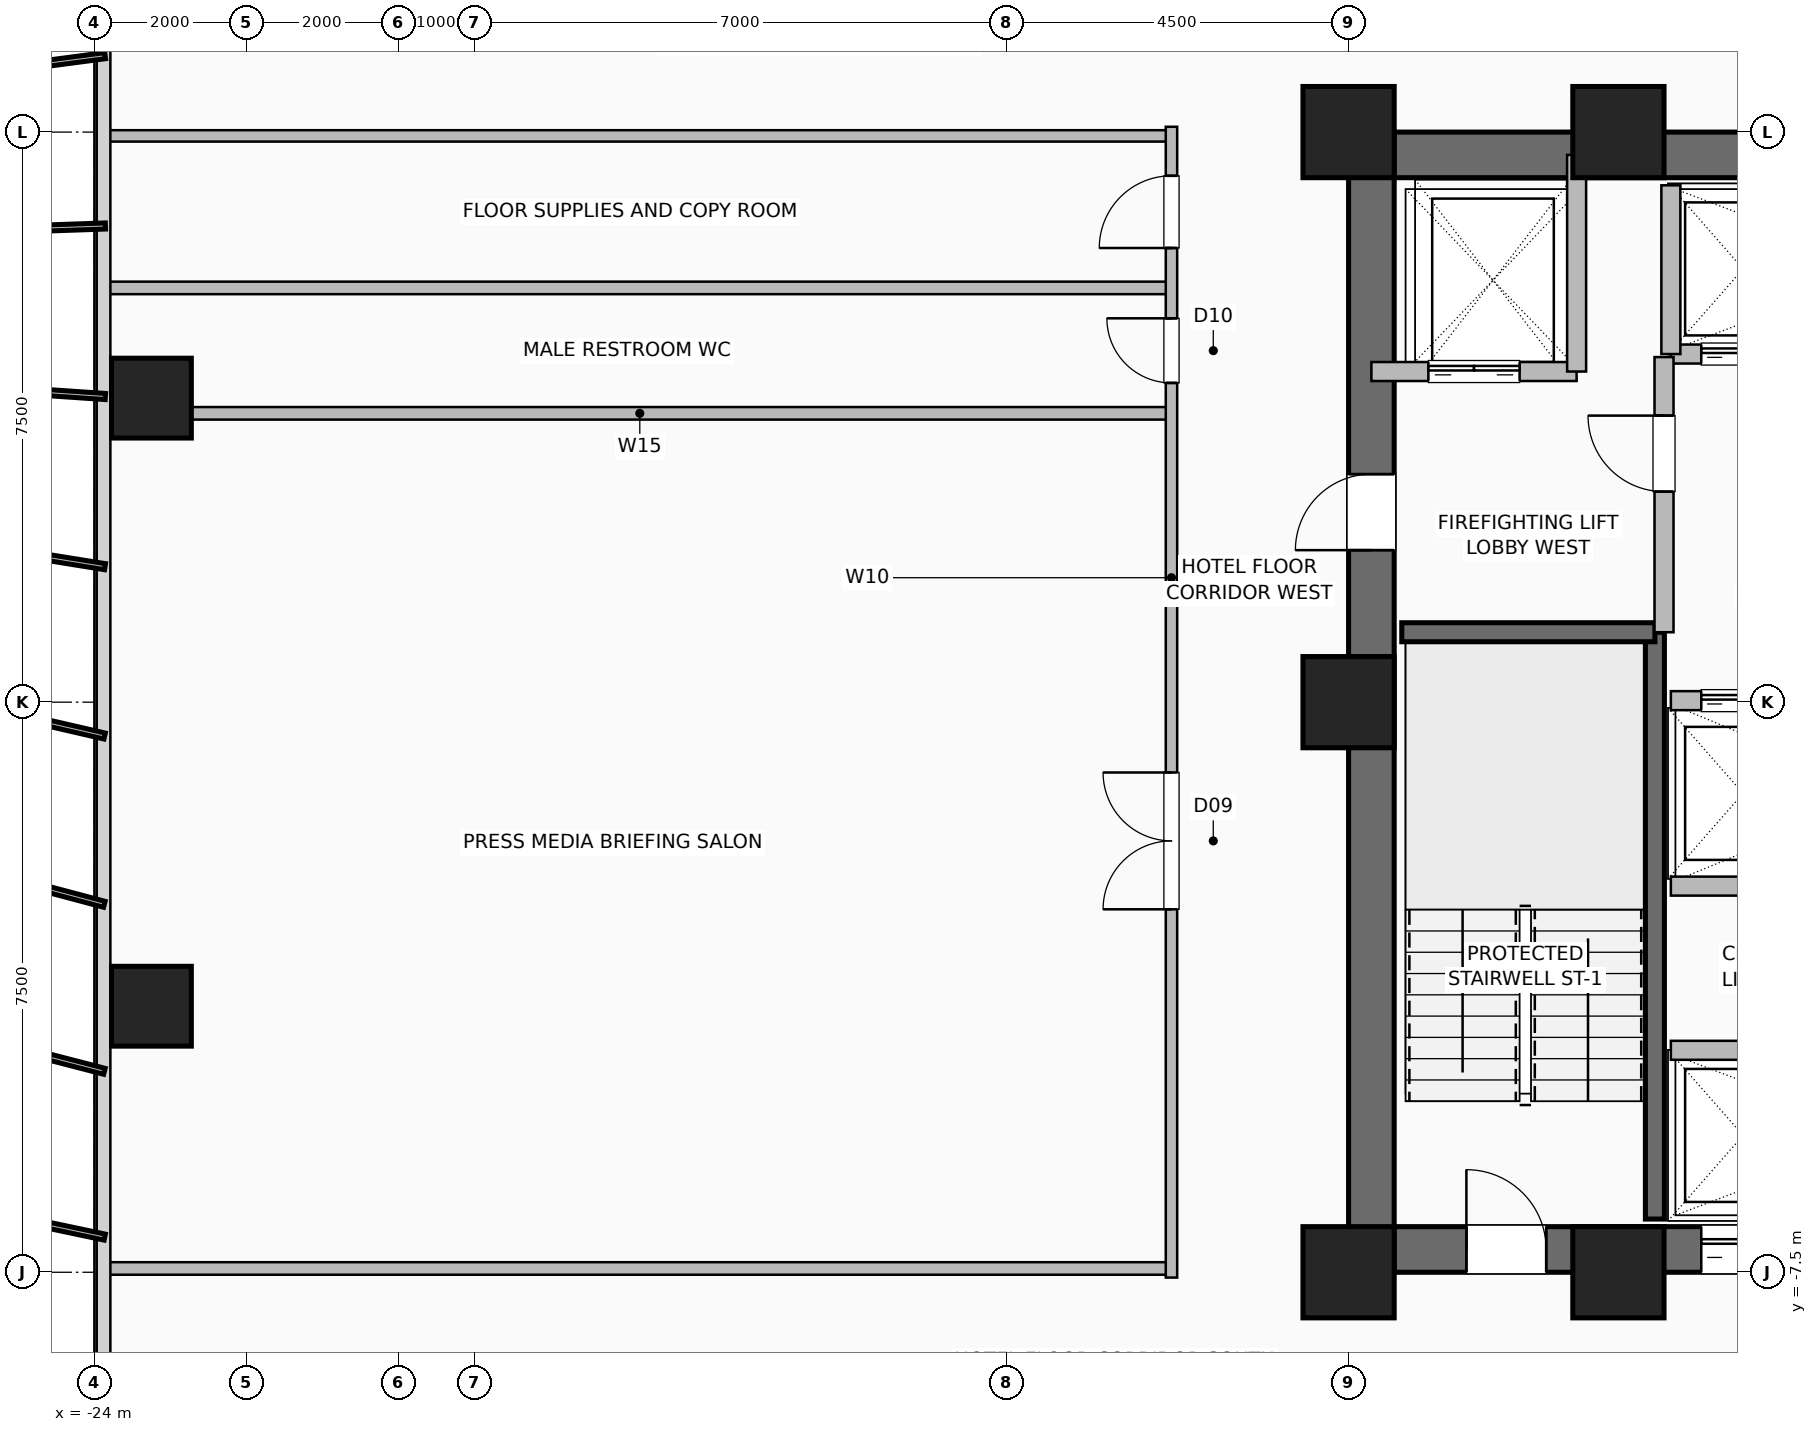
"""IFC4 building model, lengths in metres.
Left out: names, types, materials, properties, quantities, classifications, styles, units other than length and angle.
Written with IfcOpenShell. Run it as: python <this file> out.ifc"""

import sys

from ifc_helpers import new_model, si_unit, direction, frame, frame_2d, origin, origin_2d, place, context, subcontext, project, spatial, rectangle, hollow_rectangle, extrude, element, fill, save


model = new_model("IFC4")
c1 = context("Model", 3, precision=1e-05, world=origin(), true_north=direction((0.0, 1.0)))
c2 = subcontext(c1, "Body", "Model", "MODEL_VIEW")
j1 = project(units=[si_unit("LENGTHUNIT", "METRE"), si_unit("PLANEANGLEUNIT", "RADIAN")], contexts=[c1])
p1 = place(None, origin())
s1 = spatial("IfcSite", under=j1, at=p1, CompositionType="ELEMENT")
p2 = place(p1, origin())
s2 = spatial("IfcBuilding", under=s1, at=p2, CompositionType="ELEMENT")
p3 = place(p2, frame((0.0, 0.0, 37.5)))
s3 = spatial("IfcBuildingStorey", under=s2, at=p3, CompositionType="ELEMENT", Elevation=37.5)
for number, where, z_axis, x_axis in (
    (1, (-7.5, -7.5, 0.0), (0.0, 0.0, 1.0), (1.0, 0.0, 0.0)),
    (2, (-3.95, -7.5, 0.0), (0.0, 0.0, 1.0), (1.0, 0.0, 0.0)),
    (3, (-3.95, 7.5, 0.0), (0.0, 0.0, 1.0), (1.0, 0.0, 0.0)),
    (4, (-7.5, 7.5, 0.0), (0.0, 0.0, 1.0), (1.0, 0.0, 0.0)),
    (5, (-7.5, 0.0, 0.0), (0.0, 0.0, 1.0), (1.0, 0.0, 0.0)),
):
    element("IfcColumn", number, at=place(p3, frame(where, z_axis=z_axis, x_axis=x_axis)), inside=s3, PredefinedType="COLUMN", context=c2, shape_type="SweptSolid", body=[
        extrude(hollow_rectangle(XDim=1.2, YDim=1.2, WallThickness=0.055, at=origin_2d()), origin(), (0.0, 0.0, 1.0), 3.5),
    ])
for number, where, z_axis, x_axis in (
    (6, (-23.25, -4.0, 0.0), (0.0, 0.0, 1.0), (1.0, 0.0, 0.0)),
    (7, (-23.25, 4.0, 0.0), (0.0, 0.0, 1.0), (1.0, 0.0, 0.0)),
):
    element("IfcColumn", number, at=place(p3, frame(where, z_axis=z_axis, x_axis=x_axis)), inside=s3, PredefinedType="COLUMN", context=c2, shape_type="SweptSolid", body=[
        extrude(hollow_rectangle(XDim=1.05, YDim=1.05, WallThickness=0.05, at=origin_2d()), origin(), (0.0, 0.0, 1.0), 3.5),
    ])
p4 = place(p3, frame((-7.5, -7.2, 0.0), z_axis=(0.0, 0.0, 1.0), x_axis=(1.0, 0.0, 0.0)))
e8 = element("IfcWall", 8, at=p4, inside=s3, PredefinedType="SHEAR", context=c2, shape_type="SweptSolid", body=[
    extrude(rectangle(XDim=15.0, YDim=0.6, at=frame_2d((7.5, 0.0))), origin(), (0.0, 0.0, 1.0), 3.25),
])
p5 = place(p4, frame((1.55, 0.0, 0.0)))
e9 = element("IfcOpeningElement", 9, at=p5, cuts=e8, PredefinedType="OPENING", context=c2, shape_type="SweptSolid", body=[
    extrude(rectangle(XDim=1.05, YDim=2.08, at=frame_2d((0.525, 1.04))), frame((0.0, 0.31, 0.0), z_axis=(0.0, -1.0, 0.0), x_axis=(1.0, 0.0, 0.0)), (0.0, 0.0, 1.0), 0.62),
])
p6 = place(p4, frame((12.4, 0.0, 0.0)))
e10 = element("IfcOpeningElement", 10, at=p6, cuts=e8, PredefinedType="OPENING", context=c2, shape_type="SweptSolid", body=[
    extrude(rectangle(XDim=1.05, YDim=2.08, at=frame_2d((0.525, 1.04))), frame((0.0, 0.31, 0.0), z_axis=(0.0, -1.0, 0.0), x_axis=(1.0, 0.0, 0.0)), (0.0, 0.0, 1.0), 0.62),
])
p7 = place(p4, frame((4.64, 0.0, 0.0)))
e11 = element("IfcOpeningElement", 11, at=p7, cuts=e8, PredefinedType="OPENING", context=c2, shape_type="SweptSolid", body=[
    extrude(rectangle(XDim=1.1, YDim=2.2, at=frame_2d((0.55, 1.1))), frame((0.0, 0.31, 0.0), z_axis=(0.0, -1.0, 0.0), x_axis=(1.0, 0.0, 0.0)), (0.0, 0.0, 1.0), 0.62),
])
p8 = place(p4, frame((6.52, 0.0, 0.0)))
e12 = element("IfcOpeningElement", 12, at=p8, cuts=e8, PredefinedType="OPENING", context=c2, shape_type="SweptSolid", body=[
    extrude(rectangle(XDim=1.1, YDim=2.2, at=frame_2d((0.55, 1.1))), frame((0.0, 0.31, 0.0), z_axis=(0.0, -1.0, 0.0), x_axis=(1.0, 0.0, 0.0)), (0.0, 0.0, 1.0), 0.62),
])
p9 = place(p4, frame((8.4, 0.0, 0.0)))
e13 = element("IfcOpeningElement", 13, at=p9, cuts=e8, PredefinedType="OPENING", context=c2, shape_type="SweptSolid", body=[
    extrude(rectangle(XDim=1.1, YDim=2.2, at=frame_2d((0.55, 1.1))), frame((0.0, 0.31, 0.0), z_axis=(0.0, -1.0, 0.0), x_axis=(1.0, 0.0, 0.0)), (0.0, 0.0, 1.0), 0.62),
])
p10 = place(p3, frame((-7.5, 7.2, 0.0), z_axis=(0.0, 0.0, 1.0), x_axis=(1.0, 0.0, 0.0)))
e14 = element("IfcWall", 14, at=p10, inside=s3, PredefinedType="SHEAR", context=c2, shape_type="SweptSolid", body=[
    extrude(rectangle(XDim=15.0, YDim=0.6, at=frame_2d((7.5, 0.0))), origin(), (0.0, 0.0, 1.0), 3.25),
])
p11 = place(p3, frame((-7.2, -7.5, 0.0), z_axis=(0.0, 0.0, 1.0), x_axis=(0.0, 1.0, 0.0)))
e15 = element("IfcWall", 15, at=p11, inside=s3, PredefinedType="SHEAR", context=c2, shape_type="SweptSolid", body=[
    extrude(rectangle(XDim=15.0, YDim=0.6, at=frame_2d((7.5, 0.0))), origin(), (0.0, 0.0, 1.0), 3.25),
])
p12 = place(p11, frame((9.5, 0.0, 0.0)))
e16 = element("IfcOpeningElement", 16, at=p12, cuts=e15, PredefinedType="OPENING", context=c2, shape_type="SweptSolid", body=[
    extrude(rectangle(XDim=1.0, YDim=2.08, at=frame_2d((0.5, 1.04))), frame((0.0, 0.31, 0.0), z_axis=(0.0, -1.0, 0.0), x_axis=(1.0, 0.0, 0.0)), (0.0, 0.0, 1.0), 0.62),
])
p13 = place(p3, frame((-3.47, -6.8, 0.0), z_axis=(0.0, 0.0, 1.0), x_axis=(0.0, 1.0, 0.0)))
e17 = element("IfcWall", 17, at=p13, inside=s3, PredefinedType="SHEAR", context=c2, shape_type="SweptSolid", body=[
    extrude(rectangle(XDim=7.72, YDim=0.25, at=frame_2d((3.86, 0.0))), origin(), (0.0, 0.0, 1.0), 3.25),
])
p14 = place(p3, frame((-6.8, 0.92, 0.0), z_axis=(0.0, 0.0, 1.0), x_axis=(1.0, 0.0, 0.0)))
e18 = element("IfcWall", 18, at=p14, inside=s3, PredefinedType="SHEAR", context=c2, shape_type="SweptSolid", body=[
    extrude(rectangle(XDim=3.33, YDim=0.25, at=frame_2d((1.665, 0.0))), origin(), (0.0, 0.0, 1.0), 3.25),
])
p15 = place(p3, frame((-3.26, -4.58, 0.0), z_axis=(0.0, 0.0, 1.0), x_axis=(1.0, 0.0, 0.0)))
e19 = element("IfcWall", 19, at=p15, inside=s3, PredefinedType="SHEAR", context=c2, shape_type="SweptSolid", body=[
    extrude(rectangle(XDim=5.64, YDim=0.25, at=frame_2d((2.82, 0.0))), origin(), (0.0, 0.0, 1.0), 3.25),
])
p16 = place(p3, frame((-3.26, 0.02, 0.0), z_axis=(0.0, 0.0, 1.0), x_axis=(1.0, 0.0, 0.0)))
e20 = element("IfcWall", 20, at=p16, inside=s3, PredefinedType="SHEAR", context=c2, shape_type="SweptSolid", body=[
    extrude(rectangle(XDim=5.64, YDim=0.25, at=frame_2d((2.82, 0.0))), origin(), (0.0, 0.0, 1.0), 3.25),
])
p17 = place(p16, frame((0.4, 0.0, 0.0)))
e21 = element("IfcOpeningElement", 21, at=p17, cuts=e20, PredefinedType="OPENING", context=c2, shape_type="SweptSolid", body=[
    extrude(rectangle(XDim=1.1, YDim=2.2, at=frame_2d((0.55, 1.1))), frame((0.0, 0.135, 0.0), z_axis=(0.0, -1.0, 0.0), x_axis=(1.0, 0.0, 0.0)), (0.0, 0.0, 1.0), 0.27),
])
p18 = place(p16, frame((2.28, 0.0, 0.0)))
e22 = element("IfcOpeningElement", 22, at=p18, cuts=e20, PredefinedType="OPENING", context=c2, shape_type="SweptSolid", body=[
    extrude(rectangle(XDim=1.1, YDim=2.2, at=frame_2d((0.55, 1.1))), frame((0.0, 0.135, 0.0), z_axis=(0.0, -1.0, 0.0), x_axis=(1.0, 0.0, 0.0)), (0.0, 0.0, 1.0), 0.27),
])
p19 = place(p16, frame((4.16, 0.0, 0.0)))
e23 = element("IfcOpeningElement", 23, at=p19, cuts=e20, PredefinedType="OPENING", context=c2, shape_type="SweptSolid", body=[
    extrude(rectangle(XDim=1.1, YDim=2.2, at=frame_2d((0.55, 1.1))), frame((0.0, 0.135, 0.0), z_axis=(0.0, -1.0, 0.0), x_axis=(1.0, 0.0, 0.0)), (0.0, 0.0, 1.0), 0.27),
])
p20 = place(p3, frame((-3.26, -2.42, 0.0), z_axis=(0.0, 0.0, 1.0), x_axis=(1.0, 0.0, 0.0)))
e24 = element("IfcWall", 24, at=p20, inside=s3, PredefinedType="SHEAR", context=c2, shape_type="SweptSolid", body=[
    extrude(rectangle(XDim=5.64, YDim=0.25, at=frame_2d((2.82, 0.0))), origin(), (0.0, 0.0, 1.0), 3.25),
])
p21 = place(p3, frame((-3.26, 4.58, 0.0), z_axis=(0.0, 0.0, 1.0), x_axis=(1.0, 0.0, 0.0)))
e25 = element("IfcWall", 25, at=p21, inside=s3, PredefinedType="SHEAR", context=c2, shape_type="SweptSolid", body=[
    extrude(rectangle(XDim=5.64, YDim=0.25, at=frame_2d((2.82, 0.0))), origin(), (0.0, 0.0, 1.0), 3.25),
])
p22 = place(p21, frame((0.4, 0.0, 0.0)))
e26 = element("IfcOpeningElement", 26, at=p22, cuts=e25, PredefinedType="OPENING", context=c2, shape_type="SweptSolid", body=[
    extrude(rectangle(XDim=1.1, YDim=2.2, at=frame_2d((0.55, 1.1))), frame((0.0, 0.135, 0.0), z_axis=(0.0, -1.0, 0.0), x_axis=(1.0, 0.0, 0.0)), (0.0, 0.0, 1.0), 0.27),
])
p23 = place(p21, frame((2.28, 0.0, 0.0)))
e27 = element("IfcOpeningElement", 27, at=p23, cuts=e25, PredefinedType="OPENING", context=c2, shape_type="SweptSolid", body=[
    extrude(rectangle(XDim=1.1, YDim=2.2, at=frame_2d((0.55, 1.1))), frame((0.0, 0.135, 0.0), z_axis=(0.0, -1.0, 0.0), x_axis=(1.0, 0.0, 0.0)), (0.0, 0.0, 1.0), 0.27),
])
p24 = place(p21, frame((4.16, 0.0, 0.0)))
e28 = element("IfcOpeningElement", 28, at=p24, cuts=e25, PredefinedType="OPENING", context=c2, shape_type="SweptSolid", body=[
    extrude(rectangle(XDim=1.1, YDim=2.2, at=frame_2d((0.55, 1.1))), frame((0.0, 0.135, 0.0), z_axis=(0.0, -1.0, 0.0), x_axis=(1.0, 0.0, 0.0)), (0.0, 0.0, 1.0), 0.27),
])
p25 = place(p3, frame((-3.26, 4.58, 0.0), z_axis=(0.0, 0.0, 1.0), x_axis=(0.0, 1.0, 0.0)))
e29 = element("IfcWall", 29, at=p25, inside=s3, PredefinedType="SHEAR", context=c2, shape_type="SweptSolid", body=[
    extrude(rectangle(XDim=2.22, YDim=0.25, at=frame_2d((1.11, 0.0))), origin(), (0.0, 0.0, 1.0), 3.25),
])
p26 = place(p3, frame((-7.2, 4.35, 0.0), z_axis=(0.0, 0.0, 1.0), x_axis=(1.0, 0.0, 0.0)))
e30 = element("IfcWall", 30, at=p26, inside=s3, PredefinedType="SHEAR", context=c2, shape_type="SweptSolid", body=[
    extrude(rectangle(XDim=2.7, YDim=0.25, at=frame_2d((1.35, 0.0))), origin(), (0.0, 0.0, 1.0), 3.25),
])
p27 = place(p26, frame((0.75, 0.0, 0.0)))
e31 = element("IfcOpeningElement", 31, at=p27, cuts=e30, PredefinedType="OPENING", context=c2, shape_type="SweptSolid", body=[
    extrude(rectangle(XDim=1.2, YDim=2.2, at=frame_2d((0.6, 1.1))), frame((0.0, 0.135, 0.0), z_axis=(0.0, -1.0, 0.0), x_axis=(1.0, 0.0, 0.0)), (0.0, 0.0, 1.0), 0.27),
])
p28 = place(p3, frame((-4.5, 4.35, 0.0), z_axis=(0.0, 0.0, 1.0), x_axis=(0.0, 1.0, 0.0)))
e32 = element("IfcWall", 32, at=p28, inside=s3, PredefinedType="SHEAR", context=c2, shape_type="SweptSolid", body=[
    extrude(rectangle(XDim=2.85, YDim=0.25, at=frame_2d((1.425, 0.0))), origin(), (0.0, 0.0, 1.0), 3.25),
])
p29 = place(p3, frame((-3.35, 0.92, 0.0), z_axis=(0.0, 0.0, 1.0), x_axis=(0.0, 1.0, 0.0)))
e33 = element("IfcWall", 33, at=p29, inside=s3, PredefinedType="SHEAR", context=c2, shape_type="SweptSolid", body=[
    extrude(rectangle(XDim=3.62, YDim=0.25, at=frame_2d((1.81, 0.0))), origin(), (0.0, 0.0, 1.0), 3.25),
])
p30 = place(p29, frame((1.85, 0.0, 0.0)))
e34 = element("IfcOpeningElement", 34, at=p30, cuts=e33, PredefinedType="OPENING", context=c2, shape_type="SweptSolid", body=[
    extrude(rectangle(XDim=1.0, YDim=2.08, at=frame_2d((0.5, 1.04))), frame((0.0, 0.135, 0.0), z_axis=(0.0, -1.0, 0.0), x_axis=(1.0, 0.0, 0.0)), (0.0, 0.0, 1.0), 0.27),
])
for number, where, z_axis, x_axis in (
    (35, (-23.82, 5.45, 0.0), (0.0, 0.0, 1.0), (1.0, 0.0, 0.0)),
    (36, (-23.82, -7.45, 0.0), (0.0, 0.0, 1.0), (1.0, 0.0, 0.0)),
    (37, (-23.82, 3.8, 0.0), (0.0, 0.0, 1.0), (1.0, 0.0, 0.0)),
):
    element("IfcWall", number, at=place(p3, frame(where, z_axis=z_axis, x_axis=x_axis)), inside=s3, PredefinedType="PLUMBINGWALL", context=c2, shape_type="SweptSolid", body=[
        extrude(rectangle(XDim=13.99, YDim=0.165, at=frame_2d((6.995, 0.0))), origin(), (0.0, 0.0, 1.0), 3.25),
    ])
p31 = place(p3, frame((-23.82, 7.45, 0.0), z_axis=(0.0, 0.0, 1.0), x_axis=(1.0, 0.0, 0.0)))
e38 = element("IfcWall", 38, at=p31, inside=s3, PredefinedType="PARTITIONING", context=c2, shape_type="SweptSolid", body=[
    extrude(rectangle(XDim=13.99, YDim=0.15, at=frame_2d((6.995, 0.0))), origin(), (0.0, 0.0, 1.0), 3.25),
])
p32 = place(p3, frame((-9.83, -7.57, 0.0), z_axis=(0.0, 0.0, 1.0), x_axis=(0.0, 1.0, 0.0)))
e39 = element("IfcWall", 39, at=p32, inside=s3, PredefinedType="PARTITIONING", context=c2, shape_type="SweptSolid", body=[
    extrude(rectangle(XDim=15.14, YDim=0.15, at=frame_2d((7.57, 0.0))), origin(), (0.0, 0.0, 1.0), 3.25),
])
p33 = place(p32, frame((4.845, 0.0, 0.0)))
e40 = element("IfcOpeningElement", 40, at=p33, cuts=e39, PredefinedType="OPENING", context=c2, shape_type="SweptSolid", body=[
    extrude(rectangle(XDim=1.8, YDim=2.08, at=frame_2d((0.9, 1.04))), frame((0.0, 0.085, 0.0), z_axis=(0.0, -1.0, 0.0), x_axis=(1.0, 0.0, 0.0)), (0.0, 0.0, 1.0), 0.17),
])
p34 = place(p32, frame((11.77, 0.0, 0.0)))
e41 = element("IfcOpeningElement", 41, at=p34, cuts=e39, PredefinedType="OPENING", context=c2, shape_type="SweptSolid", body=[
    extrude(rectangle(XDim=0.85, YDim=2.05, at=frame_2d((0.425, 1.025))), frame((0.0, 0.085, 0.0), z_axis=(0.0, -1.0, 0.0), x_axis=(1.0, 0.0, 0.0)), (0.0, 0.0, 1.0), 0.17),
])
p35 = place(p32, frame((13.545, 0.0, 0.0)))
e42 = element("IfcOpeningElement", 42, at=p35, cuts=e39, PredefinedType="OPENING", context=c2, shape_type="SweptSolid", body=[
    extrude(rectangle(XDim=0.95, YDim=2.06, at=frame_2d((0.475, 1.03))), frame((0.0, 0.085, 0.0), z_axis=(0.0, -1.0, 0.0), x_axis=(1.0, 0.0, 0.0)), (0.0, 0.0, 1.0), 0.17),
])
p36 = place(p5, origin())
e43 = element("IfcDoor", 43, at=p36, inside=s3, OperationType="SINGLE_SWING_LEFT", PredefinedType="DOOR", context=c2, shape_type="SweptSolid", body=[
    extrude(rectangle(XDim=1.05, YDim=2.08, at=frame_2d((0.525, 1.04))), frame((0.0, 0.025, 0.0), z_axis=(0.0, -1.0, 0.0), x_axis=(1.0, 0.0, 0.0)), (0.0, 0.0, 1.0), 0.05),
])
fill(e9, e43)
p37 = place(p12, origin())
e44 = element("IfcDoor", 44, at=p37, inside=s3, OperationType="SINGLE_SWING_LEFT", PredefinedType="DOOR", context=c2, shape_type="SweptSolid", body=[
    extrude(rectangle(XDim=1.0, YDim=2.08, at=frame_2d((0.5, 1.04))), frame((0.0, 0.025, 0.0), z_axis=(0.0, -1.0, 0.0), x_axis=(1.0, 0.0, 0.0)), (0.0, 0.0, 1.0), 0.05),
])
fill(e16, e44)
p38 = place(p7, origin())
e45 = element("IfcDoor", 45, at=p38, inside=s3, OperationType="DOUBLE_DOOR_SLIDING", PredefinedType="DOOR", context=c2, shape_type="SweptSolid", body=[
    extrude(rectangle(XDim=1.1, YDim=2.2, at=frame_2d((0.55, 1.1))), frame((0.0, 0.025, 0.0), z_axis=(0.0, -1.0, 0.0), x_axis=(1.0, 0.0, 0.0)), (0.0, 0.0, 1.0), 0.05),
])
fill(e11, e45)
p39 = place(p17, origin())
e46 = element("IfcDoor", 46, at=p39, inside=s3, OperationType="DOUBLE_DOOR_SLIDING", PredefinedType="DOOR", context=c2, shape_type="SweptSolid", body=[
    extrude(rectangle(XDim=1.1, YDim=2.2, at=frame_2d((0.55, 1.1))), frame((0.0, 0.025, 0.0), z_axis=(0.0, -1.0, 0.0), x_axis=(1.0, 0.0, 0.0)), (0.0, 0.0, 1.0), 0.05),
])
fill(e21, e46)
p40 = place(p22, origin())
e47 = element("IfcDoor", 47, at=p40, inside=s3, OperationType="DOUBLE_DOOR_SLIDING", PredefinedType="DOOR", context=c2, shape_type="SweptSolid", body=[
    extrude(rectangle(XDim=1.1, YDim=2.2, at=frame_2d((0.55, 1.1))), frame((0.0, 0.025, 0.0), z_axis=(0.0, -1.0, 0.0), x_axis=(1.0, 0.0, 0.0)), (0.0, 0.0, 1.0), 0.05),
])
fill(e26, e47)
p41 = place(p27, origin())
e48 = element("IfcDoor", 48, at=p41, inside=s3, OperationType="DOUBLE_DOOR_SLIDING", PredefinedType="DOOR", context=c2, shape_type="SweptSolid", body=[
    extrude(rectangle(XDim=1.2, YDim=2.2, at=frame_2d((0.6, 1.1))), frame((0.0, 0.025, 0.0), z_axis=(0.0, -1.0, 0.0), x_axis=(1.0, 0.0, 0.0)), (0.0, 0.0, 1.0), 0.05),
])
fill(e31, e48)
p42 = place(p30, origin())
e49 = element("IfcDoor", 49, at=p42, inside=s3, OperationType="SINGLE_SWING_RIGHT", PredefinedType="DOOR", context=c2, shape_type="SweptSolid", body=[
    extrude(rectangle(XDim=1.0, YDim=2.08, at=frame_2d((0.5, 1.04))), frame((0.0, 0.025, 0.0), z_axis=(0.0, -1.0, 0.0), x_axis=(1.0, 0.0, 0.0)), (0.0, 0.0, 1.0), 0.05),
])
fill(e34, e49)
p43 = place(p33, origin())
e50 = element("IfcDoor", 50, at=p43, inside=s3, OperationType="DOUBLE_DOOR_SINGLE_SWING", PredefinedType="DOOR", context=c2, shape_type="SweptSolid", body=[
    extrude(rectangle(XDim=1.8, YDim=2.08, at=frame_2d((0.9, 1.04))), frame((0.0, 0.025, 0.0), z_axis=(0.0, -1.0, 0.0), x_axis=(1.0, 0.0, 0.0)), (0.0, 0.0, 1.0), 0.05),
])
fill(e40, e50)
p44 = place(p34, origin())
e51 = element("IfcDoor", 51, at=p44, inside=s3, OperationType="SINGLE_SWING_RIGHT", PredefinedType="DOOR", context=c2, shape_type="SweptSolid", body=[
    extrude(rectangle(XDim=0.85, YDim=2.05, at=frame_2d((0.425, 1.025))), frame((0.0, 0.025, 0.0), z_axis=(0.0, -1.0, 0.0), x_axis=(1.0, 0.0, 0.0)), (0.0, 0.0, 1.0), 0.05),
])
fill(e41, e51)
p45 = place(p35, origin())
e52 = element("IfcDoor", 52, at=p45, inside=s3, OperationType="SINGLE_SWING_LEFT", PredefinedType="DOOR", context=c2, shape_type="SweptSolid", body=[
    extrude(rectangle(XDim=0.95, YDim=2.06, at=frame_2d((0.475, 1.03))), frame((0.0, 0.025, 0.0), z_axis=(0.0, -1.0, 0.0), x_axis=(1.0, 0.0, 0.0)), (0.0, 0.0, 1.0), 0.05),
])
fill(e42, e52)
save(model, sys.argv[1])
